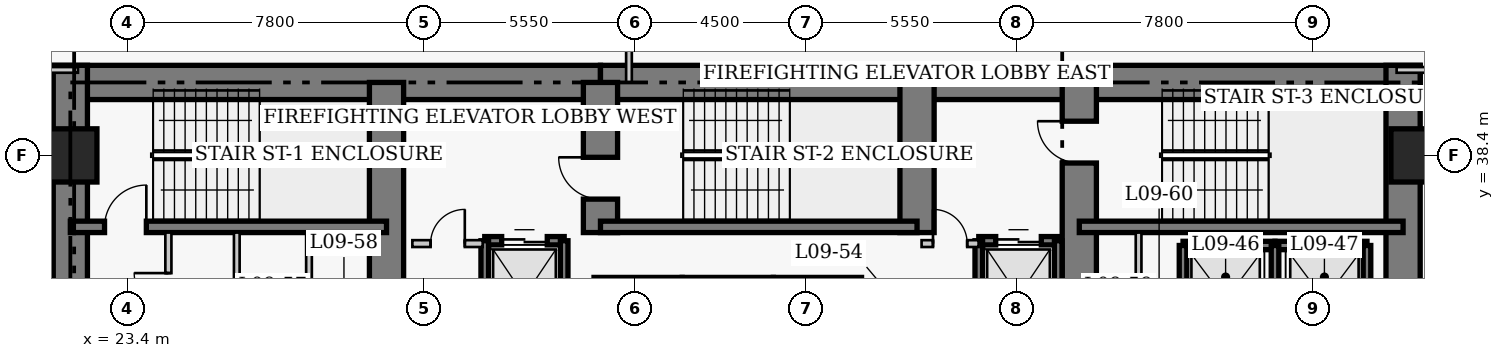
"""IFC4 building model, lengths in metres.
Left out: names, types, materials, properties, quantities, classifications, styles, units other than length and angle.
Written with IfcOpenShell. Run it as: python <this file> out.ifc"""

import sys

from ifc_helpers import new_model, si_unit, direction, frame, frame_2d, origin, origin_2d, place, context, subcontext, project, spatial, rectangle, extrude, element, fill, save


model = new_model("IFC4")
c1 = context("Model", 3, precision=1e-05, world=origin(), true_north=direction((0.0, 1.0)))
c2 = subcontext(c1, "Body", "Model", "MODEL_VIEW")
j1 = project(units=[si_unit("LENGTHUNIT", "METRE"), si_unit("PLANEANGLEUNIT", "RADIAN")], contexts=[c1])
p1 = place(None, origin())
s1 = spatial("IfcSite", under=j1, at=p1, CompositionType="ELEMENT")
p2 = place(p1, origin())
s2 = spatial("IfcBuilding", under=s1, at=p2, CompositionType="ELEMENT")
p3 = place(p2, frame((0.0, 0.0, 41.2)))
s3 = spatial("IfcBuildingStorey", under=s2, at=p3, CompositionType="ELEMENT", Elevation=41.2)
p4 = place(p3, frame((21.45, 40.32, 0.0), z_axis=(0.0, 0.0, 1.0), x_axis=(1.0, 0.0, 0.0)))
e1 = element("IfcWall", 1, at=p4, inside=s3, PredefinedType="SHEAR", context=c2, shape_type="SweptSolid", body=[
    extrude(rectangle(XDim=14.4, YDim=0.9, at=frame_2d((7.2, 0.0))), origin(), (0.0, 0.0, 1.0), 3.8),
])
p5 = place(p3, frame((35.85, 40.32, 0.0), z_axis=(0.0, 0.0, 1.0), x_axis=(1.0, 0.0, 0.0)))
e2 = element("IfcWall", 2, at=p5, inside=s3, PredefinedType="SHEAR", context=c2, shape_type="SweptSolid", body=[
    extrude(rectangle(XDim=12.6, YDim=0.9, at=frame_2d((6.3, 0.0))), origin(), (0.0, 0.0, 1.0), 3.8),
])
p6 = place(p3, frame((48.45, 40.32, 0.0), z_axis=(0.0, 0.0, 1.0), x_axis=(1.0, 0.0, 0.0)))
e3 = element("IfcWall", 3, at=p6, inside=s3, PredefinedType="SHEAR", context=c2, shape_type="SweptSolid", body=[
    extrude(rectangle(XDim=8.97, YDim=0.9, at=frame_2d((4.485, 0.0))), origin(), (0.0, 0.0, 1.0), 3.8),
])
for number, where, z_axis, x_axis in (
    (4, (21.9, 27.05, 0.0), (0.0, 0.0, 1.0), (0.0, 1.0, 0.0)),
    (5, (56.97, 27.05, 0.0), (0.0, 0.0, 1.0), (0.0, 1.0, 0.0)),
):
    element("IfcWall", number, at=place(p3, frame(where, z_axis=z_axis, x_axis=x_axis)), inside=s3, PredefinedType="SHEAR", context=c2, shape_type="SweptSolid", body=[
        extrude(rectangle(XDim=13.72, YDim=0.9, at=frame_2d((6.86, 0.0))), origin(), (0.0, 0.0, 1.0), 3.8),
    ])
p7 = place(p3, frame((30.22, 33.2, 0.0), z_axis=(0.0, 0.0, 1.0), x_axis=(0.0, 1.0, 0.0)))
e6 = element("IfcWall", 6, at=p7, inside=s3, PredefinedType="SHEAR", context=c2, shape_type="SweptSolid", body=[
    extrude(rectangle(XDim=7.12, YDim=0.9, at=frame_2d((3.56, 0.0))), origin(), (0.0, 0.0, 1.0), 3.8),
])
p8 = place(p3, frame((35.85, 36.37, 0.0), z_axis=(0.0, 0.0, 1.0), x_axis=(0.0, 1.0, 0.0)))
e7 = element("IfcWall", 7, at=p8, inside=s3, PredefinedType="SHEAR", context=c2, shape_type="SweptSolid", body=[
    extrude(rectangle(XDim=3.95, YDim=0.9, at=frame_2d((1.975, 0.0))), origin(), (0.0, 0.0, 1.0), 3.8),
])
p9 = place(p8, frame((0.88, 0.0, 0.0)))
e8 = element("IfcOpeningElement", 8, at=p9, cuts=e7, PredefinedType="OPENING", context=c2, shape_type="SweptSolid", body=[
    extrude(rectangle(XDim=1.1, YDim=2.15, at=frame_2d((0.55, 1.075))), frame((0.0, 0.46, 0.0), z_axis=(0.0, -1.0, 0.0), x_axis=(1.0, 0.0, 0.0)), (0.0, 0.0, 1.0), 0.92),
])
p10 = place(p3, frame((44.18, 36.37, 0.0), z_axis=(0.0, 0.0, 1.0), x_axis=(0.0, 1.0, 0.0)))
e9 = element("IfcWall", 9, at=p10, inside=s3, PredefinedType="SHEAR", context=c2, shape_type="SweptSolid", body=[
    extrude(rectangle(XDim=3.95, YDim=0.9, at=frame_2d((1.975, 0.0))), origin(), (0.0, 0.0, 1.0), 3.8),
])
p11 = place(p3, frame((48.45, 32.3, 0.0), z_axis=(0.0, 0.0, 1.0), x_axis=(0.0, 1.0, 0.0)))
e10 = element("IfcWall", 10, at=p11, inside=s3, PredefinedType="SHEAR", context=c2, shape_type="SweptSolid", body=[
    extrude(rectangle(XDim=8.02, YDim=0.9, at=frame_2d((4.01, 0.0))), origin(), (0.0, 0.0, 1.0), 3.8),
])
p12 = place(p11, frame((5.9, 0.0, 0.0)))
e11 = element("IfcOpeningElement", 11, at=p12, cuts=e10, PredefinedType="OPENING", context=c2, shape_type="SweptSolid", body=[
    extrude(rectangle(XDim=1.1, YDim=2.15, at=frame_2d((0.55, 1.075))), frame((0.0, 0.46, 0.0), z_axis=(0.0, -1.0, 0.0), x_axis=(1.0, 0.0, 0.0)), (0.0, 0.0, 1.0), 0.92),
])
p13 = place(p3, frame((21.9, 36.52, 0.0), z_axis=(0.0, 0.0, 1.0), x_axis=(1.0, 0.0, 0.0)))
e12 = element("IfcWall", 12, at=p13, inside=s3, PredefinedType="SHEAR", context=c2, shape_type="SweptSolid", body=[
    extrude(rectangle(XDim=8.32, YDim=0.3, at=frame_2d((4.16, 0.0))), origin(), (0.0, 0.0, 1.0), 3.8),
])
p14 = place(p13, frame((0.9, 0.0, 0.0)))
e13 = element("IfcOpeningElement", 13, at=p14, cuts=e12, PredefinedType="OPENING", context=c2, shape_type="SweptSolid", body=[
    extrude(rectangle(XDim=1.1, YDim=2.15, at=frame_2d((0.55, 1.075))), frame((0.0, 0.16, 0.0), z_axis=(0.0, -1.0, 0.0), x_axis=(1.0, 0.0, 0.0)), (0.0, 0.0, 1.0), 0.32),
])
p15 = place(p3, frame((35.85, 36.52, 0.0), z_axis=(0.0, 0.0, 1.0), x_axis=(1.0, 0.0, 0.0)))
e14 = element("IfcWall", 14, at=p15, inside=s3, PredefinedType="SHEAR", context=c2, shape_type="SweptSolid", body=[
    extrude(rectangle(XDim=8.33, YDim=0.3, at=frame_2d((4.165, 0.0))), origin(), (0.0, 0.0, 1.0), 3.8),
])
p16 = place(p3, frame((48.45, 36.52, 0.0), z_axis=(0.0, 0.0, 1.0), x_axis=(1.0, 0.0, 0.0)))
e15 = element("IfcWall", 15, at=p16, inside=s3, PredefinedType="SHEAR", context=c2, shape_type="SweptSolid", body=[
    extrude(rectangle(XDim=8.52, YDim=0.3, at=frame_2d((4.26, 0.0))), origin(), (0.0, 0.0, 1.0), 3.8),
])
for number, where, z_axis, x_axis in (
    (16, (21.9, 38.4, 0.0), (0.0, 0.0, 1.0), (1.0, 0.0, 0.0)),
    (17, (57.35, 38.4, 0.0), (0.0, 0.0, 1.0), (1.0, 0.0, 0.0)),
):
    element("IfcColumn", number, at=place(p3, frame(where, z_axis=z_axis, x_axis=x_axis)), inside=s3, PredefinedType="COLUMN", context=c2, shape_type="SweptSolid", body=[
        extrude(rectangle(XDim=1.4, YDim=1.4, at=origin_2d()), origin(), (0.0, 0.0, 1.0), 3.8),
    ])
p17 = place(p3, frame((35.68, 35.08, 0.0), z_axis=(0.0, 0.0, 1.0), x_axis=(1.0, 0.0, 0.0)))
e18 = element("IfcWall", 18, at=p17, inside=s3, PredefinedType="SHEAR", context=c2, shape_type="SweptSolid", body=[
    extrude(rectangle(XDim=2.32, YDim=0.22, at=frame_2d((1.16, 0.0))), origin(), (0.0, 0.0, 1.0), 3.8),
])
p18 = place(p3, frame((38.0, 35.08, 0.0), z_axis=(0.0, 0.0, 1.0), x_axis=(1.0, 0.0, 0.0)))
e19 = element("IfcWall", 19, at=p18, inside=s3, PredefinedType="SHEAR", context=c2, shape_type="SweptSolid", body=[
    extrude(rectangle(XDim=2.4, YDim=0.22, at=frame_2d((1.2, 0.0))), origin(), (0.0, 0.0, 1.0), 3.8),
])
p19 = place(p3, frame((40.4, 35.08, 0.0), z_axis=(0.0, 0.0, 1.0), x_axis=(1.0, 0.0, 0.0)))
e20 = element("IfcWall", 20, at=p19, inside=s3, PredefinedType="SHEAR", context=c2, shape_type="SweptSolid", body=[
    extrude(rectangle(XDim=2.32, YDim=0.22, at=frame_2d((1.16, 0.0))), origin(), (0.0, 0.0, 1.0), 3.8),
])
p20 = place(p3, frame((51.18, 36.03, 0.0), z_axis=(0.0, 0.0, 1.0), x_axis=(1.0, 0.0, 0.0)))
e21 = element("IfcWall", 21, at=p20, inside=s3, PredefinedType="SHEAR", context=c2, shape_type="SweptSolid", body=[
    extrude(rectangle(XDim=2.42, YDim=0.22, at=frame_2d((1.21, 0.0))), origin(), (0.0, 0.0, 1.0), 3.8),
])
p21 = place(p3, frame((51.18, 33.17, 0.0), z_axis=(0.0, 0.0, 1.0), x_axis=(0.0, 1.0, 0.0)))
e22 = element("IfcWall", 22, at=p21, inside=s3, PredefinedType="SHEAR", context=c2, shape_type="SweptSolid", body=[
    extrude(rectangle(XDim=2.86, YDim=0.2, at=frame_2d((1.43, 0.0))), origin(), (0.0, 0.0, 1.0), 3.8),
])
p22 = place(p3, frame((53.6, 36.03, 0.0), z_axis=(0.0, 0.0, 1.0), x_axis=(1.0, 0.0, 0.0)))
e23 = element("IfcWall", 23, at=p22, inside=s3, PredefinedType="SHEAR", context=c2, shape_type="SweptSolid", body=[
    extrude(rectangle(XDim=2.42, YDim=0.22, at=frame_2d((1.21, 0.0))), origin(), (0.0, 0.0, 1.0), 3.8),
])
for number, where, z_axis, x_axis in (
    (24, (53.6, 33.17, 0.0), (0.0, 0.0, 1.0), (0.0, 1.0, 0.0)),
    (25, (56.02, 33.17, 0.0), (0.0, 0.0, 1.0), (0.0, 1.0, 0.0)),
):
    element("IfcWall", number, at=place(p3, frame(where, z_axis=z_axis, x_axis=x_axis)), inside=s3, PredefinedType="SHEAR", context=c2, shape_type="SweptSolid", body=[
        extrude(rectangle(XDim=2.86, YDim=0.2, at=frame_2d((1.43, 0.0))), origin(), (0.0, 0.0, 1.0), 3.8),
    ])
p23 = place(p3, frame((32.805, 36.155, 0.0), z_axis=(0.0, 0.0, 1.0), x_axis=(1.0, 0.0, 0.0)))
e26 = element("IfcWall", 26, at=p23, inside=s3, PredefinedType="SHEAR", context=c2, shape_type="SweptSolid", body=[
    extrude(rectangle(XDim=2.09, YDim=0.22, at=frame_2d((1.045, 0.0))), origin(), (0.0, 0.0, 1.0), 3.8),
])
p24 = place(p23, frame((0.445, 0.0, 0.0)))
e27 = element("IfcOpeningElement", 27, at=p24, cuts=e26, PredefinedType="OPENING", context=c2, shape_type="SweptSolid", body=[
    extrude(rectangle(XDim=1.2, YDim=2.15, at=frame_2d((0.6, 1.075))), frame((0.0, 0.12, 0.0), z_axis=(0.0, -1.0, 0.0), x_axis=(1.0, 0.0, 0.0)), (0.0, 0.0, 1.0), 0.24),
])
for number, where, z_axis, x_axis in (
    (28, (32.805, 33.245, 0.0), (0.0, 0.0, 1.0), (0.0, 1.0, 0.0)),
    (29, (34.895, 33.245, 0.0), (0.0, 0.0, 1.0), (0.0, 1.0, 0.0)),
):
    element("IfcWall", number, at=place(p3, frame(where, z_axis=z_axis, x_axis=x_axis)), inside=s3, PredefinedType="SHEAR", context=c2, shape_type="SweptSolid", body=[
        extrude(rectangle(XDim=2.91, YDim=0.2, at=frame_2d((1.455, 0.0))), origin(), (0.0, 0.0, 1.0), 3.8),
    ])
p25 = place(p3, frame((45.805, 36.155, 0.0), z_axis=(0.0, 0.0, 1.0), x_axis=(1.0, 0.0, 0.0)))
e30 = element("IfcWall", 30, at=p25, inside=s3, PredefinedType="SHEAR", context=c2, shape_type="SweptSolid", body=[
    extrude(rectangle(XDim=2.09, YDim=0.22, at=frame_2d((1.045, 0.0))), origin(), (0.0, 0.0, 1.0), 3.8),
])
p26 = place(p25, frame((0.445, 0.0, 0.0)))
e31 = element("IfcOpeningElement", 31, at=p26, cuts=e30, PredefinedType="OPENING", context=c2, shape_type="SweptSolid", body=[
    extrude(rectangle(XDim=1.2, YDim=2.15, at=frame_2d((0.6, 1.075))), frame((0.0, 0.12, 0.0), z_axis=(0.0, -1.0, 0.0), x_axis=(1.0, 0.0, 0.0)), (0.0, 0.0, 1.0), 0.24),
])
p27 = place(p3, frame((45.805, 32.65, 0.0), z_axis=(0.0, 0.0, 1.0), x_axis=(0.0, 1.0, 0.0)))
e32 = element("IfcWall", 32, at=p27, inside=s3, PredefinedType="SHEAR", context=c2, shape_type="SweptSolid", body=[
    extrude(rectangle(XDim=3.505, YDim=0.2, at=frame_2d((1.752, 0.0))), origin(), (0.0, 0.0, 1.0), 3.8),
])
p28 = place(p3, frame((47.895, 33.245, 0.0), z_axis=(0.0, 0.0, 1.0), x_axis=(0.0, 1.0, 0.0)))
e33 = element("IfcWall", 33, at=p28, inside=s3, PredefinedType="SHEAR", context=c2, shape_type="SweptSolid", body=[
    extrude(rectangle(XDim=2.91, YDim=0.2, at=frame_2d((1.455, 0.0))), origin(), (0.0, 0.0, 1.0), 3.8),
])
p29 = place(p3, frame((30.9, 36.08, 0.0), z_axis=(0.0, 0.0, 1.0), x_axis=(1.0, 0.0, 0.0)))
e34 = element("IfcWall", 34, at=p29, inside=s3, PredefinedType="PARTITIONING", context=c2, shape_type="SweptSolid", body=[
    extrude(rectangle(XDim=1.85, YDim=0.18, at=frame_2d((0.925, 0.0))), origin(), (0.0, 0.0, 1.0), 3.54),
])
p30 = place(p29, frame((0.48, 0.0, 0.0)))
e35 = element("IfcOpeningElement", 35, at=p30, cuts=e34, PredefinedType="OPENING", context=c2, shape_type="SweptSolid", body=[
    extrude(rectangle(XDim=0.9, YDim=2.15, at=frame_2d((0.45, 1.075))), frame((0.0, 0.1, 0.0), z_axis=(0.0, -1.0, 0.0), x_axis=(1.0, 0.0, 0.0)), (0.0, 0.0, 1.0), 0.2),
])
p31 = place(p3, frame((44.3, 36.08, 0.0), z_axis=(0.0, 0.0, 1.0), x_axis=(1.0, 0.0, 0.0)))
e36 = element("IfcWall", 36, at=p31, inside=s3, PredefinedType="PARTITIONING", context=c2, shape_type="SweptSolid", body=[
    extrude(rectangle(XDim=1.5, YDim=0.18, at=frame_2d((0.75, 0.0))), origin(), (0.0, 0.0, 1.0), 3.54),
])
p32 = place(p31, frame((0.3, 0.0, 0.0)))
e37 = element("IfcOpeningElement", 37, at=p32, cuts=e36, PredefinedType="OPENING", context=c2, shape_type="SweptSolid", body=[
    extrude(rectangle(XDim=0.9, YDim=2.15, at=frame_2d((0.45, 1.075))), frame((0.0, 0.1, 0.0), z_axis=(0.0, -1.0, 0.0), x_axis=(1.0, 0.0, 0.0)), (0.0, 0.0, 1.0), 0.2),
])
p33 = place(p3, frame((24.48, 32.8, 0.0), z_axis=(0.0, 0.0, 1.0), x_axis=(0.0, 1.0, 0.0)))
e38 = element("IfcWall", 38, at=p33, inside=s3, PredefinedType="PARTITIONING", context=c2, shape_type="SweptSolid", body=[
    extrude(rectangle(XDim=3.57, YDim=0.16, at=frame_2d((1.785, 0.0))), origin(), (0.0, 0.0, 1.0), 3.54),
])
p34 = place(p33, frame((1.604, 0.0, 0.0)))
e39 = element("IfcOpeningElement", 39, at=p34, cuts=e38, PredefinedType="OPENING", context=c2, shape_type="SweptSolid", body=[
    extrude(rectangle(XDim=0.9, YDim=2.1, at=frame_2d((0.45, 1.05))), frame((0.0, 0.09, 0.0), z_axis=(0.0, -1.0, 0.0), x_axis=(1.0, 0.0, 0.0)), (0.0, 0.0, 1.0), 0.18),
])
for number, where, z_axis, x_axis in (
    (40, (26.28, 32.75, 0.0), (0.0, 0.0, 1.0), (0.0, 1.0, 0.0)),
    (41, (28.18, 32.75, 0.0), (0.0, 0.0, 1.0), (0.0, 1.0, 0.0)),
    (42, (50.01, 32.75, 0.0), (0.0, 0.0, 1.0), (0.0, 1.0, 0.0)),
):
    element("IfcWall", number, at=place(p3, frame(where, z_axis=z_axis, x_axis=x_axis)), inside=s3, PredefinedType="PARTITIONING", context=c2, shape_type="SweptSolid", body=[
        extrude(rectangle(XDim=3.62, YDim=0.15, at=frame_2d((1.81, 0.0))), origin(), (0.0, 0.0, 1.0), 3.54),
    ])
p35 = place(p3, frame((16.64, 40.65, 0.0), z_axis=(0.0, 0.0, 1.0), x_axis=(1.0, 0.0, 0.0)))
e43 = element("IfcWall", 43, at=p35, inside=s3, PredefinedType="PARTITIONING", context=c2, shape_type="SweptSolid", body=[
    extrude(rectangle(XDim=5.46, YDim=0.15, at=frame_2d((2.73, 0.0))), origin(), (0.0, 0.0, 1.0), 3.54),
])
p36 = place(p35, frame((0.55, 0.0, 0.0)))
e44 = element("IfcOpeningElement", 44, at=p36, cuts=e43, PredefinedType="OPENING", context=c2, shape_type="SweptSolid", body=[
    extrude(rectangle(XDim=1.0, YDim=2.15, at=frame_2d((0.5, 1.075))), frame((0.0, 0.085, 0.0), z_axis=(0.0, -1.0, 0.0), x_axis=(1.0, 0.0, 0.0)), (0.0, 0.0, 1.0), 0.17),
])
p37 = place(p3, frame((56.8, 40.65, 0.0), z_axis=(0.0, 0.0, 1.0), x_axis=(1.0, 0.0, 0.0)))
e45 = element("IfcWall", 45, at=p37, inside=s3, PredefinedType="PARTITIONING", context=c2, shape_type="SweptSolid", body=[
    extrude(rectangle(XDim=3.66, YDim=0.15, at=frame_2d((1.83, 0.0))), origin(), (0.0, 0.0, 1.0), 3.54),
])
p38 = place(p37, frame((2.05, 0.0, 0.0)))
e46 = element("IfcOpeningElement", 46, at=p38, cuts=e45, PredefinedType="OPENING", context=c2, shape_type="SweptSolid", body=[
    extrude(rectangle(XDim=1.0, YDim=2.15, at=frame_2d((0.5, 1.075))), frame((0.0, 0.085, 0.0), z_axis=(0.0, -1.0, 0.0), x_axis=(1.0, 0.0, 0.0)), (0.0, 0.0, 1.0), 0.17),
])
p39 = place(p3, frame((36.6, 40.32, 0.0), z_axis=(0.0, 0.0, 1.0), x_axis=(0.0, 1.0, 0.0)))
e47 = element("IfcWall", 47, at=p39, inside=s3, PredefinedType="PARTITIONING", context=c2, shape_type="SweptSolid", body=[
    extrude(rectangle(XDim=5.045, YDim=0.15, at=frame_2d((2.522, 0.0))), origin(), (0.0, 0.0, 1.0), 3.54),
])
p40 = place(p24, origin())
e48 = element("IfcDoor", 48, at=p40, inside=s3, OperationType="DOUBLE_DOOR_SLIDING", PredefinedType="DOOR", context=c2, shape_type="SweptSolid", body=[
    extrude(rectangle(XDim=1.2, YDim=2.15, at=frame_2d((0.6, 1.075))), frame((0.0, 0.025, 0.0), z_axis=(0.0, -1.0, 0.0), x_axis=(1.0, 0.0, 0.0)), (0.0, 0.0, 1.0), 0.05),
])
fill(e27, e48)
p41 = place(p26, origin())
e49 = element("IfcDoor", 49, at=p41, inside=s3, OperationType="DOUBLE_DOOR_SLIDING", PredefinedType="DOOR", context=c2, shape_type="SweptSolid", body=[
    extrude(rectangle(XDim=1.2, YDim=2.15, at=frame_2d((0.6, 1.075))), frame((0.0, 0.025, 0.0), z_axis=(0.0, -1.0, 0.0), x_axis=(1.0, 0.0, 0.0)), (0.0, 0.0, 1.0), 0.05),
])
fill(e31, e49)
p42 = place(p30, origin())
e50 = element("IfcDoor", 50, at=p42, inside=s3, OperationType="SINGLE_SWING_RIGHT", PredefinedType="DOOR", context=c2, shape_type="SweptSolid", body=[
    extrude(rectangle(XDim=0.9, YDim=2.15, at=frame_2d((0.45, 1.075))), frame((0.0, 0.025, 0.0), z_axis=(0.0, -1.0, 0.0), x_axis=(1.0, 0.0, 0.0)), (0.0, 0.0, 1.0), 0.05),
])
fill(e35, e50)
p43 = place(p32, origin())
e51 = element("IfcDoor", 51, at=p43, inside=s3, OperationType="SINGLE_SWING_LEFT", PredefinedType="DOOR", context=c2, shape_type="SweptSolid", body=[
    extrude(rectangle(XDim=0.9, YDim=2.15, at=frame_2d((0.45, 1.075))), frame((0.0, 0.025, 0.0), z_axis=(0.0, -1.0, 0.0), x_axis=(1.0, 0.0, 0.0)), (0.0, 0.0, 1.0), 0.05),
])
fill(e37, e51)
p44 = place(p34, origin())
e52 = element("IfcDoor", 52, at=p44, inside=s3, OperationType="SINGLE_SWING_RIGHT", PredefinedType="DOOR", context=c2, shape_type="SweptSolid", body=[
    extrude(rectangle(XDim=0.9, YDim=2.1, at=frame_2d((0.45, 1.05))), frame((0.0, 0.025, 0.0), z_axis=(0.0, -1.0, 0.0), x_axis=(1.0, 0.0, 0.0)), (0.0, 0.0, 1.0), 0.05),
])
fill(e39, e52)
p45 = place(p14, origin())
e53 = element("IfcDoor", 53, at=p45, inside=s3, OperationType="SINGLE_SWING_RIGHT", PredefinedType="DOOR", context=c2, shape_type="SweptSolid", body=[
    extrude(rectangle(XDim=1.1, YDim=2.15, at=frame_2d((0.55, 1.075))), frame((0.0, 0.025, 0.0), z_axis=(0.0, -1.0, 0.0), x_axis=(1.0, 0.0, 0.0)), (0.0, 0.0, 1.0), 0.05),
])
fill(e13, e53)
p46 = place(p9, origin())
e54 = element("IfcDoor", 54, at=p46, inside=s3, OperationType="SINGLE_SWING_RIGHT", PredefinedType="DOOR", context=c2, shape_type="SweptSolid", body=[
    extrude(rectangle(XDim=1.1, YDim=2.15, at=frame_2d((0.55, 1.075))), frame((0.0, 0.025, 0.0), z_axis=(0.0, -1.0, 0.0), x_axis=(1.0, 0.0, 0.0)), (0.0, 0.0, 1.0), 0.05),
])
fill(e8, e54)
p47 = place(p12, origin())
e55 = element("IfcDoor", 55, at=p47, inside=s3, OperationType="SINGLE_SWING_RIGHT", PredefinedType="DOOR", context=c2, shape_type="SweptSolid", body=[
    extrude(rectangle(XDim=1.1, YDim=2.15, at=frame_2d((0.55, 1.075))), frame((0.0, 0.025, 0.0), z_axis=(0.0, -1.0, 0.0), x_axis=(1.0, 0.0, 0.0)), (0.0, 0.0, 1.0), 0.05),
])
fill(e11, e55)
save(model, sys.argv[1])
